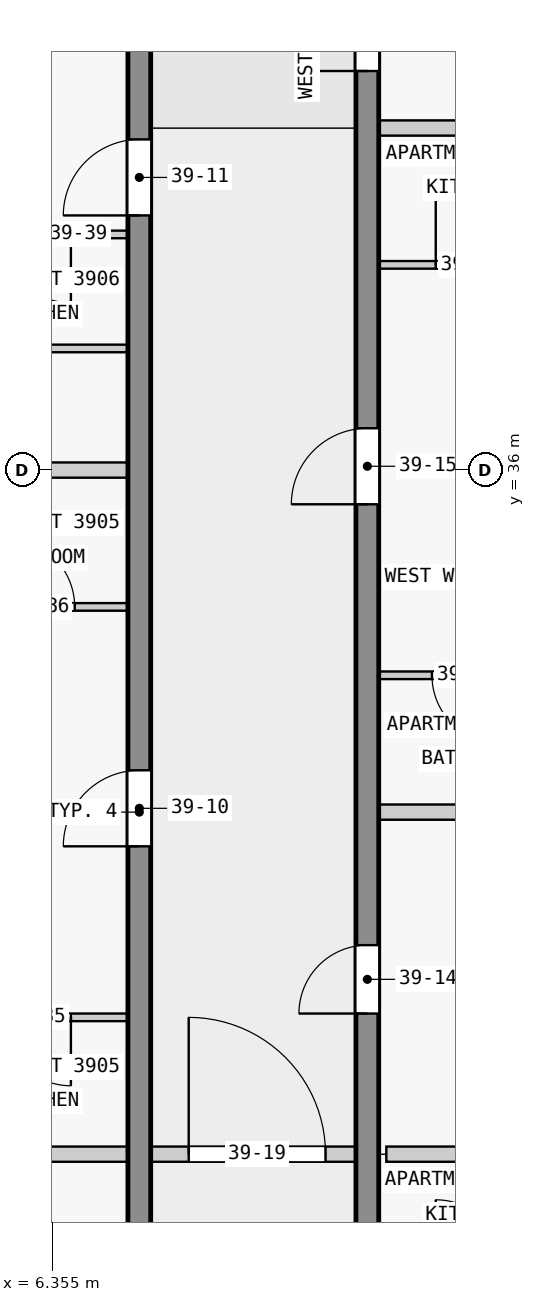
"""IFC4 building model, lengths in metres.
Left out: names, types, materials, properties, quantities, classifications, styles, units other than length and angle.
Written with IfcOpenShell. Run it as: python <this file> out.ifc"""

import sys

from ifc_helpers import new_model, si_unit, direction, frame, frame_2d, origin, place, context, subcontext, project, spatial, rectangle, extrude, element, fill, save


model = new_model("IFC4")
c1 = context("Model", 3, precision=1e-05, world=origin(), true_north=direction((0.0, 1.0)))
c2 = subcontext(c1, "Body", "Model", "MODEL_VIEW")
j1 = project(units=[si_unit("LENGTHUNIT", "METRE"), si_unit("PLANEANGLEUNIT", "RADIAN")], contexts=[c1])
p1 = place(None, origin())
s1 = spatial("IfcSite", under=j1, at=p1, CompositionType="ELEMENT")
p2 = place(p1, origin())
s2 = spatial("IfcBuilding", under=s1, at=p2, CompositionType="ELEMENT")
p3 = place(p2, frame((0.0, 0.0, 153.4)))
s3 = spatial("IfcBuildingStorey", under=s2, at=p3, CompositionType="ELEMENT", Elevation=153.4)
p4 = place(p3, frame((7.5, 18.0, 0.0), z_axis=(0.0, 0.0, 1.0), x_axis=(0.0, 1.0, 0.0)))
e1 = element("IfcWall", 1, at=p4, inside=s3, PredefinedType="SHEAR", context=c2, shape_type="SweptSolid", body=[
    extrude(rectangle(XDim=27.0, YDim=0.3, at=frame_2d((13.5, 0.0))), origin(), (0.0, 0.0, 1.0), 3.25),
])
p5 = place(p4, frame((1.75, 0.0, 0.0)))
e2 = element("IfcOpeningElement", 2, at=p5, cuts=e1, PredefinedType="OPENING", context=c2, shape_type="SweptSolid", body=[
    extrude(rectangle(XDim=1.0, YDim=2.1, at=frame_2d((0.5, 1.05))), frame((0.0, 0.16, 0.0), z_axis=(0.0, -1.0, 0.0), x_axis=(1.0, 0.0, 0.0)), (0.0, 0.0, 1.0), 0.32),
])
p6 = place(p4, frame((5.85, 0.0, 0.0)))
e3 = element("IfcOpeningElement", 3, at=p6, cuts=e1, PredefinedType="OPENING", context=c2, shape_type="SweptSolid", body=[
    extrude(rectangle(XDim=1.8, YDim=2.1, at=frame_2d((0.9, 1.05))), frame((0.0, 0.16, 0.0), z_axis=(0.0, -1.0, 0.0), x_axis=(1.0, 0.0, 0.0)), (0.0, 0.0, 1.0), 0.32),
])
p7 = place(p4, frame((13.05, 0.0, 0.0)))
e4 = element("IfcOpeningElement", 4, at=p7, cuts=e1, PredefinedType="OPENING", context=c2, shape_type="SweptSolid", body=[
    extrude(rectangle(XDim=1.0, YDim=2.1, at=frame_2d((0.5, 1.05))), frame((0.0, 0.16, 0.0), z_axis=(0.0, -1.0, 0.0), x_axis=(1.0, 0.0, 0.0)), (0.0, 0.0, 1.0), 0.32),
])
p8 = place(p4, frame((21.35, 0.0, 0.0)))
e5 = element("IfcOpeningElement", 5, at=p8, cuts=e1, PredefinedType="OPENING", context=c2, shape_type="SweptSolid", body=[
    extrude(rectangle(XDim=1.0, YDim=2.1, at=frame_2d((0.5, 1.05))), frame((0.0, 0.16, 0.0), z_axis=(0.0, -1.0, 0.0), x_axis=(1.0, 0.0, 0.0)), (0.0, 0.0, 1.0), 0.32),
])
p9 = place(p3, frame((10.5, 18.0, 0.0), z_axis=(0.0, 0.0, 1.0), x_axis=(0.0, 1.0, 0.0)))
e6 = element("IfcWall", 6, at=p9, inside=s3, PredefinedType="SHEAR", context=c2, shape_type="SweptSolid", body=[
    extrude(rectangle(XDim=27.0, YDim=0.3, at=frame_2d((13.5, 0.0))), origin(), (0.0, 0.0, 1.0), 3.25),
])
p10 = place(p9, frame((1.85, 0.0, 0.0)))
e7 = element("IfcOpeningElement", 7, at=p10, cuts=e6, PredefinedType="OPENING", context=c2, shape_type="SweptSolid", body=[
    extrude(rectangle(XDim=0.9, YDim=2.1, at=frame_2d((0.45, 1.05))), frame((0.0, 0.16, 0.0), z_axis=(0.0, -1.0, 0.0), x_axis=(1.0, 0.0, 0.0)), (0.0, 0.0, 1.0), 0.32),
])
p11 = place(p9, frame((6.25, 0.0, 0.0)))
e8 = element("IfcOpeningElement", 8, at=p11, cuts=e6, PredefinedType="OPENING", context=c2, shape_type="SweptSolid", body=[
    extrude(rectangle(XDim=1.0, YDim=2.1, at=frame_2d((0.5, 1.05))), frame((0.0, 0.16, 0.0), z_axis=(0.0, -1.0, 0.0), x_axis=(1.0, 0.0, 0.0)), (0.0, 0.0, 1.0), 0.32),
])
p12 = place(p9, frame((10.85, 0.0, 0.0)))
e9 = element("IfcOpeningElement", 9, at=p12, cuts=e6, PredefinedType="OPENING", context=c2, shape_type="SweptSolid", body=[
    extrude(rectangle(XDim=0.9, YDim=2.1, at=frame_2d((0.45, 1.05))), frame((0.0, 0.16, 0.0), z_axis=(0.0, -1.0, 0.0), x_axis=(1.0, 0.0, 0.0)), (0.0, 0.0, 1.0), 0.32),
])
p13 = place(p9, frame((17.55, 0.0, 0.0)))
e10 = element("IfcOpeningElement", 10, at=p13, cuts=e6, PredefinedType="OPENING", context=c2, shape_type="SweptSolid", body=[
    extrude(rectangle(XDim=1.0, YDim=2.1, at=frame_2d((0.5, 1.05))), frame((0.0, 0.16, 0.0), z_axis=(0.0, -1.0, 0.0), x_axis=(1.0, 0.0, 0.0)), (0.0, 0.0, 1.0), 0.32),
])
p14 = place(p9, frame((23.25, 0.0, 0.0)))
e11 = element("IfcOpeningElement", 11, at=p14, cuts=e6, PredefinedType="OPENING", context=c2, shape_type="SweptSolid", body=[
    extrude(rectangle(XDim=0.9, YDim=2.1, at=frame_2d((0.45, 1.05))), frame((0.0, 0.16, 0.0), z_axis=(0.0, -1.0, 0.0), x_axis=(1.0, 0.0, 0.0)), (0.0, 0.0, 1.0), 0.32),
])
p15 = place(p9, frame((25.45, 0.0, 0.0)))
e12 = element("IfcOpeningElement", 12, at=p15, cuts=e6, PredefinedType="OPENING", context=c2, shape_type="SweptSolid", body=[
    extrude(rectangle(XDim=1.0, YDim=2.1, at=frame_2d((0.5, 1.05))), frame((0.0, 0.16, 0.0), z_axis=(0.0, -1.0, 0.0), x_axis=(1.0, 0.0, 0.0)), (0.0, 0.0, 1.0), 0.32),
])
p16 = place(p3, frame((7.35, 27.0, 0.0), z_axis=(0.0, 0.0, 1.0), x_axis=(-1.0, 0.0, 0.0)))
e13 = element("IfcWall", 13, at=p16, inside=s3, PredefinedType="PARTITIONING", context=c2, shape_type="SweptSolid", body=[
    extrude(rectangle(XDim=7.43, YDim=0.2, at=frame_2d((3.715, 0.0))), origin(), (0.0, 0.0, 1.0), 3.25),
])
p17 = place(p3, frame((12.95, 27.0, 0.0), z_axis=(0.0, 0.0, 1.0), x_axis=(-1.0, 0.0, 0.0)))
e14 = element("IfcWall", 14, at=p17, inside=s3, PredefinedType="PARTITIONING", context=c2, shape_type="SweptSolid", body=[
    extrude(rectangle(XDim=2.2, YDim=0.2, at=frame_2d((1.1, 0.0))), origin(), (0.0, 0.0, 1.0), 3.25),
])
p18 = place(p3, frame((7.35, 28.8, 0.0), z_axis=(0.0, 0.0, 1.0), x_axis=(-1.0, 0.0, 0.0)))
e15 = element("IfcWall", 15, at=p18, inside=s3, PredefinedType="PARTITIONING", context=c2, shape_type="SweptSolid", body=[
    extrude(rectangle(XDim=2.4, YDim=0.1, at=frame_2d((1.2, 0.0))), origin(), (0.0, 0.0, 1.0), 3.25),
])
p19 = place(p18, frame((0.75, 0.0, 0.0)))
e16 = element("IfcOpeningElement", 16, at=p19, cuts=e15, PredefinedType="OPENING", context=c2, shape_type="SweptSolid", body=[
    extrude(rectangle(XDim=0.9, YDim=2.1, at=frame_2d((0.45, 1.05))), frame((0.0, 0.06, 0.0), z_axis=(0.0, -1.0, 0.0), x_axis=(1.0, 0.0, 0.0)), (0.0, 0.0, 1.0), 0.12),
])
p20 = place(p3, frame((17.85, 31.5, 0.0), z_axis=(0.0, 0.0, 1.0), x_axis=(-1.0, 0.0, 0.0)))
e17 = element("IfcWall", 17, at=p20, inside=s3, PredefinedType="PARTITIONING", context=c2, shape_type="SweptSolid", body=[
    extrude(rectangle(XDim=7.2, YDim=0.2, at=frame_2d((3.6, 0.0))), origin(), (0.0, 0.0, 1.0), 3.25),
])
p21 = place(p3, frame((13.0, 33.3, 0.0), z_axis=(0.0, 0.0, 1.0), x_axis=(-1.0, 0.0, 0.0)))
e18 = element("IfcWall", 18, at=p21, inside=s3, PredefinedType="PARTITIONING", context=c2, shape_type="SweptSolid", body=[
    extrude(rectangle(XDim=2.35, YDim=0.1, at=frame_2d((1.175, 0.0))), origin(), (0.0, 0.0, 1.0), 3.25),
])
p22 = place(p21, frame((0.75, 0.0, 0.0)))
e19 = element("IfcOpeningElement", 19, at=p22, cuts=e18, PredefinedType="OPENING", context=c2, shape_type="SweptSolid", body=[
    extrude(rectangle(XDim=0.9, YDim=2.1, at=frame_2d((0.45, 1.05))), frame((0.0, 0.06, 0.0), z_axis=(0.0, -1.0, 0.0), x_axis=(1.0, 0.0, 0.0)), (0.0, 0.0, 1.0), 0.12),
])
p23 = place(p3, frame((5.0, 34.2, 0.0), z_axis=(0.0, 0.0, 1.0), x_axis=(1.0, 0.0, 0.0)))
e20 = element("IfcWall", 20, at=p23, inside=s3, PredefinedType="PARTITIONING", context=c2, shape_type="SweptSolid", body=[
    extrude(rectangle(XDim=2.35, YDim=0.1, at=frame_2d((1.175, 0.0))), origin(), (0.0, 0.0, 1.0), 3.25),
])
p24 = place(p23, frame((0.75, 0.0, 0.0)))
e21 = element("IfcOpeningElement", 21, at=p24, cuts=e20, PredefinedType="OPENING", context=c2, shape_type="SweptSolid", body=[
    extrude(rectangle(XDim=0.9, YDim=2.1, at=frame_2d((0.45, 1.05))), frame((0.0, 0.06, 0.0), z_axis=(0.0, -1.0, 0.0), x_axis=(1.0, 0.0, 0.0)), (0.0, 0.0, 1.0), 0.12),
])
p25 = place(p3, frame((7.35, 36.0, 0.0), z_axis=(0.0, 0.0, 1.0), x_axis=(-1.0, 0.0, 0.0)))
e22 = element("IfcWall", 22, at=p25, inside=s3, PredefinedType="PARTITIONING", context=c2, shape_type="SweptSolid", body=[
    extrude(rectangle(XDim=5.95, YDim=0.2, at=frame_2d((2.975, 0.0))), origin(), (0.0, 0.0, 1.0), 3.25),
])
p26 = place(p3, frame((7.35, 37.6, 0.0), z_axis=(0.0, 0.0, 1.0), x_axis=(-1.0, 0.0, 0.0)))
e23 = element("IfcWall", 23, at=p26, inside=s3, PredefinedType="PARTITIONING", context=c2, shape_type="SweptSolid", body=[
    extrude(rectangle(XDim=2.35, YDim=0.1, at=frame_2d((1.175, 0.0))), origin(), (0.0, 0.0, 1.0), 3.25),
])
p27 = place(p3, frame((10.65, 38.7, 0.0), z_axis=(0.0, 0.0, 1.0), x_axis=(1.0, 0.0, 0.0)))
e24 = element("IfcWall", 24, at=p27, inside=s3, PredefinedType="PARTITIONING", context=c2, shape_type="SweptSolid", body=[
    extrude(rectangle(XDim=2.4, YDim=0.1, at=frame_2d((1.2, 0.0))), origin(), (0.0, 0.0, 1.0), 3.25),
])
p28 = place(p27, frame((0.75, 0.0, 0.0)))
e25 = element("IfcOpeningElement", 25, at=p28, cuts=e24, PredefinedType="OPENING", context=c2, shape_type="SweptSolid", body=[
    extrude(rectangle(XDim=0.9, YDim=2.1, at=frame_2d((0.45, 1.05))), frame((0.0, 0.06, 0.0), z_axis=(0.0, -1.0, 0.0), x_axis=(1.0, 0.0, 0.0)), (0.0, 0.0, 1.0), 0.12),
])
p29 = place(p3, frame((7.35, 39.1, 0.0), z_axis=(0.0, 0.0, 1.0), x_axis=(-1.0, 0.0, 0.0)))
e26 = element("IfcWall", 26, at=p29, inside=s3, PredefinedType="PARTITIONING", context=c2, shape_type="SweptSolid", body=[
    extrude(rectangle(XDim=2.35, YDim=0.1, at=frame_2d((1.175, 0.0))), origin(), (0.0, 0.0, 1.0), 3.25),
])
p30 = place(p29, frame((0.75, 0.0, 0.0)))
e27 = element("IfcOpeningElement", 27, at=p30, cuts=e26, PredefinedType="OPENING", context=c2, shape_type="SweptSolid", body=[
    extrude(rectangle(XDim=0.9, YDim=2.1, at=frame_2d((0.45, 1.05))), frame((0.0, 0.06, 0.0), z_axis=(0.0, -1.0, 0.0), x_axis=(1.0, 0.0, 0.0)), (0.0, 0.0, 1.0), 0.12),
])
p31 = place(p3, frame((12.95, 40.5, 0.0), z_axis=(0.0, 0.0, 1.0), x_axis=(-1.0, 0.0, 0.0)))
e28 = element("IfcWall", 28, at=p31, inside=s3, PredefinedType="PARTITIONING", context=c2, shape_type="SweptSolid", body=[
    extrude(rectangle(XDim=2.3, YDim=0.2, at=frame_2d((1.15, 0.0))), origin(), (0.0, 0.0, 1.0), 3.25),
])
p32 = place(p3, frame((7.45, 27.0, 0.0), z_axis=(0.0, 0.0, 1.0), x_axis=(1.0, 0.0, 0.0)))
e29 = element("IfcWall", 29, at=p32, inside=s3, PredefinedType="PARTITIONING", context=c2, shape_type="SweptSolid", body=[
    extrude(rectangle(XDim=3.2, YDim=0.2, at=frame_2d((1.6, 0.0))), origin(), (0.0, 0.0, 1.0), 3.25),
])
p33 = place(p32, frame((0.7, 0.0, 0.0)))
e30 = element("IfcOpeningElement", 30, at=p33, cuts=e29, PredefinedType="OPENING", context=c2, shape_type="SweptSolid", body=[
    extrude(rectangle(XDim=1.8, YDim=2.1, at=frame_2d((0.9, 1.05))), frame((0.0, 0.11, 0.0), z_axis=(0.0, -1.0, 0.0), x_axis=(1.0, 0.0, 0.0)), (0.0, 0.0, 1.0), 0.22),
])
p34 = place(p7, origin())
e31 = element("IfcDoor", 31, at=p34, inside=s3, OperationType="SINGLE_SWING_RIGHT", PredefinedType="DOOR", context=c2, shape_type="SweptSolid", body=[
    extrude(rectangle(XDim=1.0, YDim=2.1, at=frame_2d((0.5, 1.05))), frame((0.0, 0.025, 0.0), z_axis=(0.0, -1.0, 0.0), x_axis=(1.0, 0.0, 0.0)), (0.0, 0.0, 1.0), 0.05),
])
fill(e4, e31)
p35 = place(p8, origin())
e32 = element("IfcDoor", 32, at=p35, inside=s3, OperationType="SINGLE_SWING_RIGHT", PredefinedType="DOOR", context=c2, shape_type="SweptSolid", body=[
    extrude(rectangle(XDim=1.0, YDim=2.1, at=frame_2d((0.5, 1.05))), frame((0.0, 0.025, 0.0), z_axis=(0.0, -1.0, 0.0), x_axis=(1.0, 0.0, 0.0)), (0.0, 0.0, 1.0), 0.05),
])
fill(e5, e32)
p36 = place(p12, origin())
e33 = element("IfcDoor", 33, at=p36, inside=s3, OperationType="SINGLE_SWING_LEFT", PredefinedType="DOOR", context=c2, shape_type="SweptSolid", body=[
    extrude(rectangle(XDim=0.9, YDim=2.1, at=frame_2d((0.45, 1.05))), frame((0.0, 0.025, 0.0), z_axis=(0.0, -1.0, 0.0), x_axis=(1.0, 0.0, 0.0)), (0.0, 0.0, 1.0), 0.05),
])
fill(e9, e33)
p37 = place(p13, origin())
e34 = element("IfcDoor", 34, at=p37, inside=s3, OperationType="SINGLE_SWING_RIGHT", PredefinedType="DOOR", context=c2, shape_type="SweptSolid", body=[
    extrude(rectangle(XDim=1.0, YDim=2.1, at=frame_2d((0.5, 1.05))), frame((0.0, 0.025, 0.0), z_axis=(0.0, -1.0, 0.0), x_axis=(1.0, 0.0, 0.0)), (0.0, 0.0, 1.0), 0.05),
])
fill(e10, e34)
p38 = place(p14, origin())
e35 = element("IfcDoor", 35, at=p38, inside=s3, OperationType="SINGLE_SWING_RIGHT", PredefinedType="DOOR", context=c2, shape_type="SweptSolid", body=[
    extrude(rectangle(XDim=0.9, YDim=2.1, at=frame_2d((0.45, 1.05))), frame((0.0, 0.025, 0.0), z_axis=(0.0, -1.0, 0.0), x_axis=(1.0, 0.0, 0.0)), (0.0, 0.0, 1.0), 0.05),
])
fill(e11, e35)
p39 = place(p33, origin())
e36 = element("IfcDoor", 36, at=p39, inside=s3, OperationType="SINGLE_SWING_LEFT", PredefinedType="DOOR", context=c2, shape_type="SweptSolid", body=[
    extrude(rectangle(XDim=1.8, YDim=2.1, at=frame_2d((0.9, 1.05))), frame((0.0, 0.025, 0.0), z_axis=(0.0, -1.0, 0.0), x_axis=(1.0, 0.0, 0.0)), (0.0, 0.0, 1.0), 0.05),
])
fill(e30, e36)
p40 = place(p19, origin())
e37 = element("IfcDoor", 37, at=p40, inside=s3, OperationType="SINGLE_SWING_RIGHT", PredefinedType="DOOR", context=c2, shape_type="SweptSolid", body=[
    extrude(rectangle(XDim=0.9, YDim=2.1, at=frame_2d((0.45, 1.05))), frame((0.0, 0.025, 0.0), z_axis=(0.0, -1.0, 0.0), x_axis=(1.0, 0.0, 0.0)), (0.0, 0.0, 1.0), 0.05),
])
fill(e16, e37)
p41 = place(p24, origin())
e38 = element("IfcDoor", 38, at=p41, inside=s3, OperationType="SINGLE_SWING_RIGHT", PredefinedType="DOOR", context=c2, shape_type="SweptSolid", body=[
    extrude(rectangle(XDim=0.9, YDim=2.1, at=frame_2d((0.45, 1.05))), frame((0.0, 0.025, 0.0), z_axis=(0.0, -1.0, 0.0), x_axis=(1.0, 0.0, 0.0)), (0.0, 0.0, 1.0), 0.05),
])
fill(e21, e38)
p42 = place(p30, origin())
e39 = element("IfcDoor", 39, at=p42, inside=s3, OperationType="SINGLE_SWING_RIGHT", PredefinedType="DOOR", context=c2, shape_type="SweptSolid", body=[
    extrude(rectangle(XDim=0.9, YDim=2.1, at=frame_2d((0.45, 1.05))), frame((0.0, 0.025, 0.0), z_axis=(0.0, -1.0, 0.0), x_axis=(1.0, 0.0, 0.0)), (0.0, 0.0, 1.0), 0.05),
])
fill(e27, e39)
p43 = place(p22, origin())
e40 = element("IfcDoor", 40, at=p43, inside=s3, OperationType="SINGLE_SWING_RIGHT", PredefinedType="DOOR", context=c2, shape_type="SweptSolid", body=[
    extrude(rectangle(XDim=0.9, YDim=2.1, at=frame_2d((0.45, 1.05))), frame((0.0, 0.025, 0.0), z_axis=(0.0, -1.0, 0.0), x_axis=(1.0, 0.0, 0.0)), (0.0, 0.0, 1.0), 0.05),
])
fill(e19, e40)
p44 = place(p28, origin())
e41 = element("IfcDoor", 41, at=p44, inside=s3, OperationType="SINGLE_SWING_LEFT", PredefinedType="DOOR", context=c2, shape_type="SweptSolid", body=[
    extrude(rectangle(XDim=0.9, YDim=2.1, at=frame_2d((0.45, 1.05))), frame((0.0, 0.025, 0.0), z_axis=(0.0, -1.0, 0.0), x_axis=(1.0, 0.0, 0.0)), (0.0, 0.0, 1.0), 0.05),
])
fill(e25, e41)
save(model, sys.argv[1])
